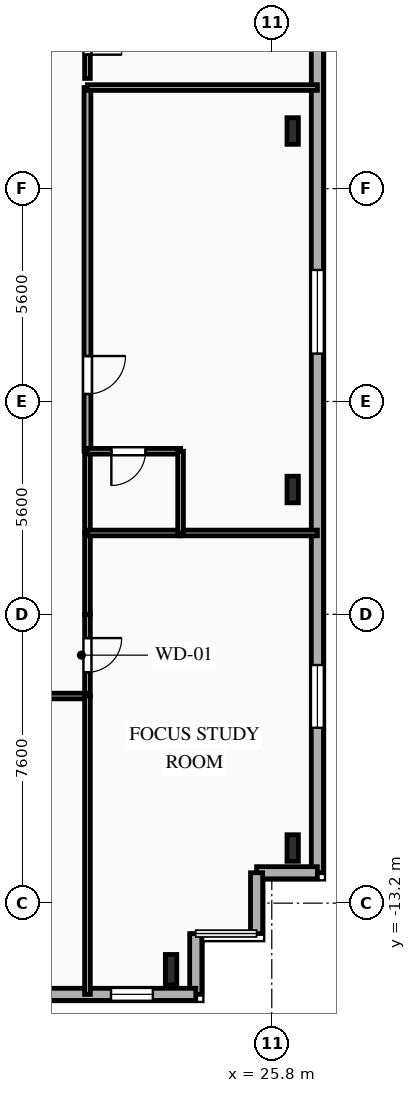
"""IFC4 building model, lengths in metres.
Left out: names, types, materials, properties, quantities, classifications, styles, units other than length and angle.
Written with IfcOpenShell. Run it as: python <this file> out.ifc"""

import sys

from ifc_helpers import new_model, si_unit, direction, frame, frame_2d, origin, origin_2d, place, context, subcontext, project, spatial, rectangle, i_section, extrude, element, fill, save


model = new_model("IFC4")
c1 = context("Model", 3, precision=1e-05, world=origin(), true_north=direction((0.0, 1.0)))
c2 = subcontext(c1, "Body", "Model", "MODEL_VIEW")
j1 = project(units=[si_unit("LENGTHUNIT", "METRE"), si_unit("PLANEANGLEUNIT", "RADIAN")], contexts=[c1])
p1 = place(None, origin())
s1 = spatial("IfcSite", under=j1, at=p1, CompositionType="ELEMENT")
p2 = place(p1, origin())
s2 = spatial("IfcBuilding", under=s1, at=p2, CompositionType="ELEMENT")
p3 = place(p2, frame((0.0, 0.0, 151.1)))
s3 = spatial("IfcBuildingStorey", under=s2, at=p3, CompositionType="ELEMENT", Elevation=151.1)
p4 = place(p3, frame((23.15, -14.95, 0.0), z_axis=(0.0, 0.0, 1.0), x_axis=(1.0, 0.0, 0.0)))
e1 = element("IfcColumn", 1, at=p4, inside=s3, PredefinedType="COLUMN", context=c2, shape_type="SweptSolid", body=[
    extrude(i_section(OverallWidth=0.3, OverallDepth=0.8, WebThickness=0.018, FlangeThickness=0.033, FilletRadius=0.03, at=origin_2d()), origin(), (0.0, 0.0, 1.0), 3.35),
])
for number, where, z_axis, x_axis in (
    (2, (26.35, -11.75, 0.0), (0.0, 0.0, 1.0), (1.0, 0.0, 0.0)),
    (3, (26.35, -2.317, 0.0), (0.0, 0.0, 1.0), (1.0, 0.0, 0.0)),
    (4, (26.35, 7.117, 0.0), (0.0, 0.0, 1.0), (1.0, 0.0, 0.0)),
):
    element("IfcColumn", number, at=place(p3, frame(where, z_axis=z_axis, x_axis=x_axis)), inside=s3, PredefinedType="COLUMN", context=c2, shape_type="SweptSolid", body=[
        extrude(i_section(OverallWidth=0.3, OverallDepth=0.7, WebThickness=0.017, FlangeThickness=0.032, FilletRadius=0.027, at=origin_2d()), origin(), (0.0, 0.0, 1.0), 3.35),
    ])
p5 = place(p3, frame((27.0, 17.2, 0.0), z_axis=(0.0, 0.0, 1.0), x_axis=(0.0, -1.0, 0.0)))
e5 = element("IfcWall", 5, at=p5, inside=s3, PredefinedType="SOLIDWALL", context=c2, shape_type="SweptSolid", body=[
    extrude(rectangle(XDim=29.6, YDim=0.32, at=frame_2d((14.8, 0.0))), origin(), (0.0, 0.0, 1.0), 3.04),
])
p6 = place(p5, frame((3.895, 0.0, 0.85)))
e6 = element("IfcOpeningElement", 6, at=p6, cuts=e5, PredefinedType="OPENING", context=c2, shape_type="SweptSolid", body=[
    extrude(rectangle(XDim=1.65, YDim=1.85, at=frame_2d((0.825, 0.925))), frame((0.0, 0.17, 0.0), z_axis=(0.0, -1.0, 0.0), x_axis=(1.0, 0.0, 0.0)), (0.0, 0.0, 1.0), 0.34),
])
p7 = place(p5, frame((13.74, 0.0, 0.85)))
e7 = element("IfcOpeningElement", 7, at=p7, cuts=e5, PredefinedType="OPENING", context=c2, shape_type="SweptSolid", body=[
    extrude(rectangle(XDim=2.2, YDim=1.85, at=frame_2d((1.1, 0.925))), frame((0.0, 0.17, 0.0), z_axis=(0.0, -1.0, 0.0), x_axis=(1.0, 0.0, 0.0)), (0.0, 0.0, 1.0), 0.34),
])
p8 = place(p5, frame((24.135, 0.0, 0.85)))
e8 = element("IfcOpeningElement", 8, at=p8, cuts=e5, PredefinedType="OPENING", context=c2, shape_type="SweptSolid", body=[
    extrude(rectangle(XDim=1.65, YDim=1.85, at=frame_2d((0.825, 0.925))), frame((0.0, 0.17, 0.0), z_axis=(0.0, -1.0, 0.0), x_axis=(1.0, 0.0, 0.0)), (0.0, 0.0, 1.0), 0.34),
])
for number, where, z_axis, x_axis in (
    (9, (27.0, -12.4, 0.0), (0.0, 0.0, 1.0), (-1.0, 0.0, 0.0)),
    (10, (25.4, -12.4, 0.0), (0.0, 0.0, 1.0), (0.0, -1.0, 0.0)),
    (11, (23.8, -14.0, 0.0), (0.0, 0.0, 1.0), (0.0, -1.0, 0.0)),
):
    element("IfcWall", number, at=place(p3, frame(where, z_axis=z_axis, x_axis=x_axis)), inside=s3, PredefinedType="SOLIDWALL", context=c2, shape_type="SweptSolid", body=[
        extrude(rectangle(XDim=1.6, YDim=0.32, at=frame_2d((0.8, 0.0))), origin(), (0.0, 0.0, 1.0), 3.04),
    ])
p9 = place(p3, frame((23.8, -15.6, 0.0), z_axis=(0.0, 0.0, 1.0), x_axis=(-1.0, 0.0, 0.0)))
e12 = element("IfcWall", 12, at=p9, inside=s3, PredefinedType="SOLIDWALL", context=c2, shape_type="SweptSolid", body=[
    extrude(rectangle(XDim=49.6, YDim=0.32, at=frame_2d((24.8, 0.0))), origin(), (0.0, 0.0, 1.0), 3.04),
])
p10 = place(p9, frame((1.13, 0.0, 0.85)))
e13 = element("IfcOpeningElement", 13, at=p10, cuts=e12, PredefinedType="OPENING", context=c2, shape_type="SweptSolid", body=[
    extrude(rectangle(XDim=1.1, YDim=1.85, at=frame_2d((0.55, 0.925))), frame((0.0, 0.17, 0.0), z_axis=(0.0, -1.0, 0.0), x_axis=(1.0, 0.0, 0.0)), (0.0, 0.0, 1.0), 0.34),
])
p11 = place(p9, frame((5.055, 0.0, 0.85)))
e14 = element("IfcOpeningElement", 14, at=p11, cuts=e12, PredefinedType="OPENING", context=c2, shape_type="SweptSolid", body=[
    extrude(rectangle(XDim=1.65, YDim=1.85, at=frame_2d((0.825, 0.925))), frame((0.0, 0.17, 0.0), z_axis=(0.0, -1.0, 0.0), x_axis=(1.0, 0.0, 0.0)), (0.0, 0.0, 1.0), 0.34),
])
p12 = place(p9, frame((10.78, 0.0, 0.85)))
e15 = element("IfcOpeningElement", 15, at=p12, cuts=e12, PredefinedType="OPENING", context=c2, shape_type="SweptSolid", body=[
    extrude(rectangle(XDim=2.2, YDim=1.85, at=frame_2d((1.1, 0.925))), frame((0.0, 0.17, 0.0), z_axis=(0.0, -1.0, 0.0), x_axis=(1.0, 0.0, 0.0)), (0.0, 0.0, 1.0), 0.34),
])
p13 = place(p9, frame((17.284, 0.0, 0.85)))
e16 = element("IfcOpeningElement", 16, at=p13, cuts=e12, PredefinedType="OPENING", context=c2, shape_type="SweptSolid", body=[
    extrude(rectangle(XDim=2.2, YDim=1.85, at=frame_2d((1.1, 0.925))), frame((0.0, 0.17, 0.0), z_axis=(0.0, -1.0, 0.0), x_axis=(1.0, 0.0, 0.0)), (0.0, 0.0, 1.0), 0.34),
])
p14 = place(p9, frame((22.248, 0.0, 0.85)))
e17 = element("IfcOpeningElement", 17, at=p14, cuts=e12, PredefinedType="OPENING", context=c2, shape_type="SweptSolid", body=[
    extrude(rectangle(XDim=2.2, YDim=1.85, at=frame_2d((1.1, 0.925))), frame((0.0, 0.17, 0.0), z_axis=(0.0, -1.0, 0.0), x_axis=(1.0, 0.0, 0.0)), (0.0, 0.0, 1.0), 0.34),
])
p15 = place(p9, frame((28.7, 0.0, 0.85)))
e18 = element("IfcOpeningElement", 18, at=p15, cuts=e12, PredefinedType="OPENING", context=c2, shape_type="SweptSolid", body=[
    extrude(rectangle(XDim=2.2, YDim=1.85, at=frame_2d((1.1, 0.925))), frame((0.0, 0.17, 0.0), z_axis=(0.0, -1.0, 0.0), x_axis=(1.0, 0.0, 0.0)), (0.0, 0.0, 1.0), 0.34),
])
p16 = place(p9, frame((34.7, 0.0, 0.85)))
e19 = element("IfcOpeningElement", 19, at=p16, cuts=e12, PredefinedType="OPENING", context=c2, shape_type="SweptSolid", body=[
    extrude(rectangle(XDim=2.2, YDim=1.85, at=frame_2d((1.1, 0.925))), frame((0.0, 0.17, 0.0), z_axis=(0.0, -1.0, 0.0), x_axis=(1.0, 0.0, 0.0)), (0.0, 0.0, 1.0), 0.34),
])
p17 = place(p9, frame((41.492, 0.0, 0.85)))
e20 = element("IfcOpeningElement", 20, at=p17, cuts=e12, PredefinedType="OPENING", context=c2, shape_type="SweptSolid", body=[
    extrude(rectangle(XDim=1.65, YDim=1.85, at=frame_2d((0.825, 0.925))), frame((0.0, 0.17, 0.0), z_axis=(0.0, -1.0, 0.0), x_axis=(1.0, 0.0, 0.0)), (0.0, 0.0, 1.0), 0.34),
])
p18 = place(p9, frame((46.175, 0.0, 0.85)))
e21 = element("IfcOpeningElement", 21, at=p18, cuts=e12, PredefinedType="OPENING", context=c2, shape_type="SweptSolid", body=[
    extrude(rectangle(XDim=1.65, YDim=1.85, at=frame_2d((0.825, 0.925))), frame((0.0, 0.17, 0.0), z_axis=(0.0, -1.0, 0.0), x_axis=(1.0, 0.0, 0.0)), (0.0, 0.0, 1.0), 0.34),
])
p19 = place(p3, frame((20.95, 10.65, 0.0), z_axis=(0.0, 0.0, 1.0), x_axis=(0.0, -1.0, 0.0)))
e22 = element("IfcWall", 22, at=p19, inside=s3, PredefinedType="PARTITIONING", context=c2, shape_type="SweptSolid", body=[
    extrude(rectangle(XDim=2.15, YDim=0.15, at=frame_2d((1.075, 0.0))), origin(), (0.0, 0.0, 1.0), 3.04),
])
p20 = place(p19, frame((0.625, 0.0, 0.0)))
e23 = element("IfcOpeningElement", 23, at=p20, cuts=e22, PredefinedType="OPENING", context=c2, shape_type="SweptSolid", body=[
    extrude(rectangle(XDim=0.9, YDim=2.1, at=frame_2d((0.45, 1.05))), frame((0.0, 0.085, 0.0), z_axis=(0.0, -1.0, 0.0), x_axis=(1.0, 0.0, 0.0)), (0.0, 0.0, 1.0), 0.17),
])
p21 = place(p3, frame((20.95, -5.6, 0.0), z_axis=(0.0, 0.0, 1.0), x_axis=(0.0, -1.0, 0.0)))
e24 = element("IfcWall", 24, at=p21, inside=s3, PredefinedType="PARTITIONING", context=c2, shape_type="SweptSolid", body=[
    extrude(rectangle(XDim=2.15, YDim=0.15, at=frame_2d((1.075, 0.0))), origin(), (0.0, 0.0, 1.0), 3.04),
])
p22 = place(p21, frame((0.625, 0.0, 0.0)))
e25 = element("IfcOpeningElement", 25, at=p22, cuts=e24, PredefinedType="OPENING", context=c2, shape_type="SweptSolid", body=[
    extrude(rectangle(XDim=0.9, YDim=2.1, at=frame_2d((0.45, 1.05))), frame((0.0, 0.085, 0.0), z_axis=(0.0, -1.0, 0.0), x_axis=(1.0, 0.0, 0.0)), (0.0, 0.0, 1.0), 0.17),
])
p23 = place(p3, frame((20.95, -7.75, 0.0), z_axis=(0.0, 0.0, 1.0), x_axis=(-1.0, 0.0, 0.0)))
e26 = element("IfcWall", 26, at=p23, inside=s3, PredefinedType="PARTITIONING", context=c2, shape_type="SweptSolid", body=[
    extrude(rectangle(XDim=5.986, YDim=0.15, at=frame_2d((2.993, 0.0))), origin(), (0.0, 0.0, 1.0), 3.04),
])
p24 = place(p23, frame((3.884, 0.0, 0.0)))
e27 = element("IfcOpeningElement", 27, at=p24, cuts=e26, PredefinedType="OPENING", context=c2, shape_type="SweptSolid", body=[
    extrude(rectangle(XDim=1.05, YDim=2.15, at=frame_2d((0.525, 1.075))), frame((0.0, 0.085, 0.0), z_axis=(0.0, -1.0, 0.0), x_axis=(1.0, 0.0, 0.0)), (0.0, 0.0, 1.0), 0.17),
])
p25 = place(p3, frame((20.95, -3.46, 0.0), z_axis=(0.0, 0.0, 1.0), x_axis=(0.0, -1.0, 0.0)))
e28 = element("IfcWall", 28, at=p25, inside=s3, PredefinedType="PARTITIONING", context=c2, shape_type="SweptSolid", body=[
    extrude(rectangle(XDim=2.14, YDim=0.15, at=frame_2d((1.07, 0.0))), origin(), (0.0, 0.0, 1.0), 3.04),
])
p26 = place(p3, frame((20.95, 8.26, 0.0), z_axis=(0.0, 0.0, 1.0), x_axis=(0.0, -1.0, 0.0)))
e29 = element("IfcWall", 29, at=p26, inside=s3, PredefinedType="PARTITIONING", context=c2, shape_type="SweptSolid", body=[
    extrude(rectangle(XDim=9.57, YDim=0.18, at=frame_2d((4.785, 0.0))), origin(), (0.0, 0.0, 1.0), 3.04),
])
p27 = place(p26, frame((7.064, 0.0, 0.0)))
e30 = element("IfcOpeningElement", 30, at=p27, cuts=e29, PredefinedType="OPENING", context=c2, shape_type="SweptSolid", body=[
    extrude(rectangle(XDim=1.0, YDim=2.15, at=frame_2d((0.5, 1.075))), frame((0.0, 0.1, 0.0), z_axis=(0.0, -1.0, 0.0), x_axis=(1.0, 0.0, 0.0)), (0.0, 0.0, 1.0), 0.2),
])
p28 = place(p3, frame((20.95, -1.31, 0.0), z_axis=(0.0, 0.0, 1.0), x_axis=(0.0, -1.0, 0.0)))
e31 = element("IfcWall", 31, at=p28, inside=s3, PredefinedType="PLUMBINGWALL", context=c2, shape_type="SweptSolid", body=[
    extrude(rectangle(XDim=2.15, YDim=0.15, at=frame_2d((1.075, 0.0))), origin(), (0.0, 0.0, 1.0), 3.04),
])
p29 = place(p3, frame((23.4, -3.46, 0.0), z_axis=(0.0, 0.0, 1.0), x_axis=(1.0, 0.0, 0.0)))
e32 = element("IfcWall", 32, at=p29, inside=s3, PredefinedType="PARTITIONING", context=c2, shape_type="SweptSolid", body=[
    extrude(rectangle(XDim=3.6, YDim=0.15, at=frame_2d((1.8, 0.0))), origin(), (0.0, 0.0, 1.0), 3.04),
])
p30 = place(p3, frame((20.95, -3.46, 0.0), z_axis=(0.0, 0.0, 1.0), x_axis=(1.0, 0.0, 0.0)))
e33 = element("IfcWall", 33, at=p30, inside=s3, PredefinedType="PLUMBINGWALL", context=c2, shape_type="SweptSolid", body=[
    extrude(rectangle(XDim=2.45, YDim=0.15, at=frame_2d((1.225, 0.0))), origin(), (0.0, 0.0, 1.0), 3.04),
])
p31 = place(p3, frame((20.95, -15.6, 0.0), z_axis=(0.0, 0.0, 1.0), x_axis=(0.0, 1.0, 0.0)))
e34 = element("IfcWall", 34, at=p31, inside=s3, PredefinedType="PARTITIONING", context=c2, shape_type="SweptSolid", body=[
    extrude(rectangle(XDim=7.85, YDim=0.15, at=frame_2d((3.925, 0.0))), origin(), (0.0, 0.0, 1.0), 3.04),
])
p32 = place(p3, frame((23.4, -1.31, 0.0), z_axis=(0.0, 0.0, 1.0), x_axis=(-1.0, 0.0, 0.0)))
e35 = element("IfcWall", 35, at=p32, inside=s3, PredefinedType="PLUMBINGWALL", context=c2, shape_type="SweptSolid", body=[
    extrude(rectangle(XDim=2.45, YDim=0.15, at=frame_2d((1.225, 0.0))), origin(), (0.0, 0.0, 1.0), 3.04),
])
p33 = place(p32, frame((0.921, 0.0, 0.0)))
e36 = element("IfcOpeningElement", 36, at=p33, cuts=e35, PredefinedType="OPENING", context=c2, shape_type="SweptSolid", body=[
    extrude(rectangle(XDim=0.9, YDim=2.1, at=frame_2d((0.45, 1.05))), frame((0.0, 0.085, 0.0), z_axis=(0.0, -1.0, 0.0), x_axis=(1.0, 0.0, 0.0)), (0.0, 0.0, 1.0), 0.17),
])
p34 = place(p3, frame((23.4, -3.46, 0.0), z_axis=(0.0, 0.0, 1.0), x_axis=(0.0, 1.0, 0.0)))
e37 = element("IfcWall", 37, at=p34, inside=s3, PredefinedType="PLUMBINGWALL", context=c2, shape_type="SweptSolid", body=[
    extrude(rectangle(XDim=2.15, YDim=0.15, at=frame_2d((1.075, 0.0))), origin(), (0.0, 0.0, 1.0), 3.04),
])
p35 = place(p3, frame((20.95, 8.26, 0.0), z_axis=(0.0, 0.0, 1.0), x_axis=(1.0, 0.0, 0.0)))
e38 = element("IfcWall", 38, at=p35, inside=s3, PredefinedType="PARTITIONING", context=c2, shape_type="SweptSolid", body=[
    extrude(rectangle(XDim=6.05, YDim=0.15, at=frame_2d((3.025, 0.0))), origin(), (0.0, 0.0, 1.0), 3.04),
])
p36 = place(p7, origin())
e39 = element("IfcWindow", 39, at=p36, inside=s3, PartitioningType="SINGLE_PANEL", PredefinedType="WINDOW", context=c2, shape_type="SweptSolid", body=[
    extrude(rectangle(XDim=2.2, YDim=1.85, at=frame_2d((1.1, 0.925))), frame((0.0, 0.03, 0.0), z_axis=(0.0, -1.0, 0.0), x_axis=(1.0, 0.0, 0.0)), (0.0, 0.0, 1.0), 0.06),
])
fill(e7, e39)
p37 = place(p8, origin())
e40 = element("IfcWindow", 40, at=p37, inside=s3, PartitioningType="SINGLE_PANEL", PredefinedType="WINDOW", context=c2, shape_type="SweptSolid", body=[
    extrude(rectangle(XDim=1.65, YDim=1.85, at=frame_2d((0.825, 0.925))), frame((0.0, 0.03, 0.0), z_axis=(0.0, -1.0, 0.0), x_axis=(1.0, 0.0, 0.0)), (0.0, 0.0, 1.0), 0.06),
])
fill(e8, e40)
p38 = place(p10, origin())
e41 = element("IfcWindow", 41, at=p38, inside=s3, PartitioningType="SINGLE_PANEL", PredefinedType="WINDOW", context=c2, shape_type="SweptSolid", body=[
    extrude(rectangle(XDim=1.1, YDim=1.85, at=frame_2d((0.55, 0.925))), frame((0.0, 0.03, 0.0), z_axis=(0.0, -1.0, 0.0), x_axis=(1.0, 0.0, 0.0)), (0.0, 0.0, 1.0), 0.06),
])
fill(e13, e41)
p39 = place(p20, origin())
e42 = element("IfcDoor", 42, at=p39, inside=s3, OperationType="SINGLE_SWING_RIGHT", PredefinedType="DOOR", context=c2, shape_type="SweptSolid", body=[
    extrude(rectangle(XDim=0.9, YDim=2.1, at=frame_2d((0.45, 1.05))), frame((0.0, 0.025, 0.0), z_axis=(0.0, -1.0, 0.0), x_axis=(1.0, 0.0, 0.0)), (0.0, 0.0, 1.0), 0.05),
])
fill(e23, e42)
p40 = place(p22, origin())
e43 = element("IfcDoor", 43, at=p40, inside=s3, OperationType="SINGLE_SWING_LEFT", PredefinedType="DOOR", context=c2, shape_type="SweptSolid", body=[
    extrude(rectangle(XDim=0.9, YDim=2.1, at=frame_2d((0.45, 1.05))), frame((0.0, 0.025, 0.0), z_axis=(0.0, -1.0, 0.0), x_axis=(1.0, 0.0, 0.0)), (0.0, 0.0, 1.0), 0.05),
])
fill(e25, e43)
p41 = place(p27, origin())
e44 = element("IfcDoor", 44, at=p41, inside=s3, OperationType="SINGLE_SWING_LEFT", PredefinedType="DOOR", context=c2, shape_type="SweptSolid", body=[
    extrude(rectangle(XDim=1.0, YDim=2.15, at=frame_2d((0.5, 1.075))), frame((0.0, 0.025, 0.0), z_axis=(0.0, -1.0, 0.0), x_axis=(1.0, 0.0, 0.0)), (0.0, 0.0, 1.0), 0.05),
])
fill(e30, e44)
p42 = place(p33, origin())
e45 = element("IfcDoor", 45, at=p42, inside=s3, OperationType="SINGLE_SWING_RIGHT", PredefinedType="DOOR", context=c2, shape_type="SweptSolid", body=[
    extrude(rectangle(XDim=0.9, YDim=2.1, at=frame_2d((0.45, 1.05))), frame((0.0, 0.025, 0.0), z_axis=(0.0, -1.0, 0.0), x_axis=(1.0, 0.0, 0.0)), (0.0, 0.0, 1.0), 0.05),
])
fill(e36, e45)
save(model, sys.argv[1])
